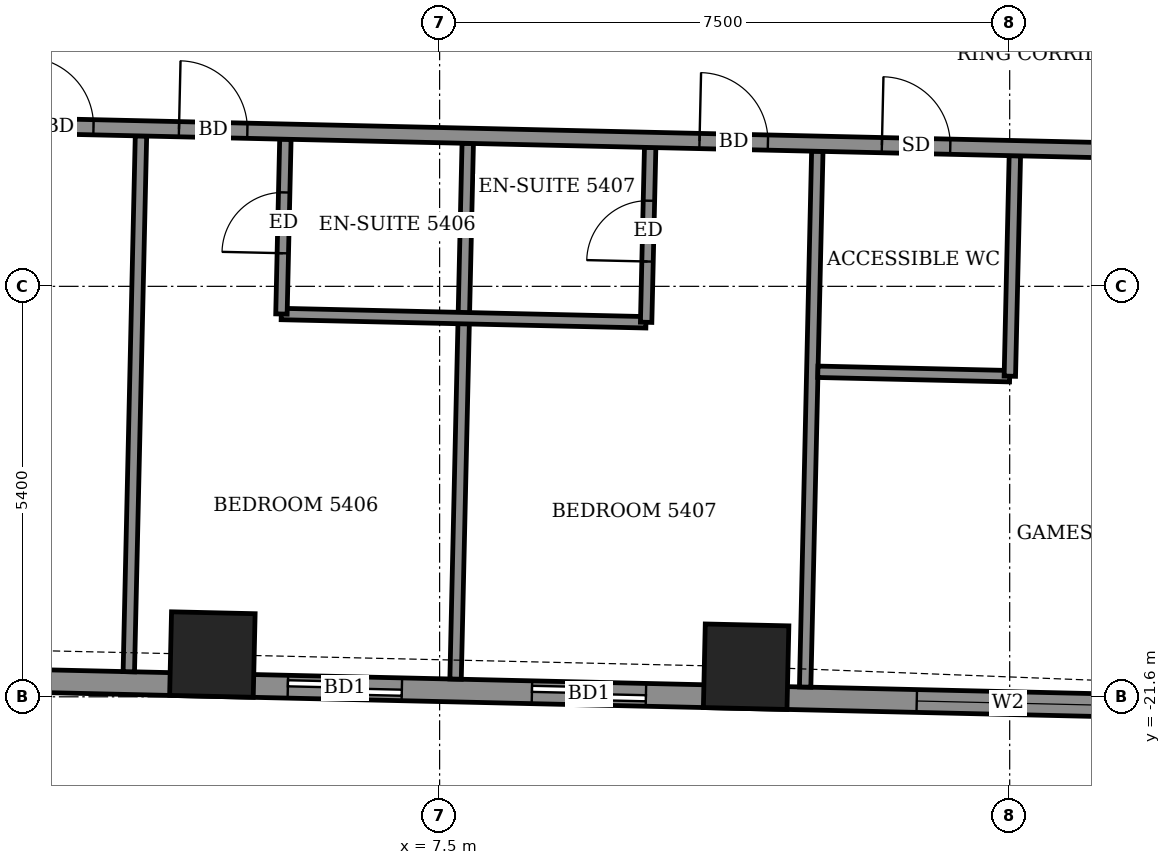
"""IFC4 building model, lengths in metres.
Left out: names, types, materials, properties, quantities, classifications, styles, units other than length and angle.
Written with IfcOpenShell. Run it as: python <this file> out.ifc"""

import sys

from ifc_helpers import new_model, si_unit, direction, frame, frame_2d, origin, origin_2d, place, context, subcontext, project, spatial, rectangle, extrude, element, fill, save


model = new_model("IFC4")
c1 = context("Model", 3, precision=1e-05, world=origin(), true_north=direction((0.0, 1.0)))
c2 = subcontext(c1, "Body", "Model", "MODEL_VIEW")
j1 = project(units=[si_unit("LENGTHUNIT", "METRE"), si_unit("PLANEANGLEUNIT", "RADIAN")], contexts=[c1])
p1 = place(None, origin())
s1 = spatial("IfcSite", under=j1, at=p1, CompositionType="ELEMENT")
p2 = place(p1, origin())
s2 = spatial("IfcBuilding", under=s1, at=p2, CompositionType="ELEMENT")
p3 = place(p2, frame((0.0, 0.0, 212.3)))
s3 = spatial("IfcBuildingStorey", under=s2, at=p3, CompositionType="ELEMENT", Elevation=212.3)
for number, where, z_axis, x_axis in (
    (1, (4.51, -21.044, -0.55), (0.0, 0.0, 1.0), (1.0, -0.023, 0.0)),
    (2, (11.532, -21.204, -0.55), (0.0, 0.0, 1.0), (1.0, -0.023, 0.0)),
):
    element("IfcColumn", number, at=place(p3, frame(where, z_axis=z_axis, x_axis=x_axis)), inside=s3, PredefinedType="COLUMN", context=c2, shape_type="SweptSolid", body=[
        extrude(rectangle(XDim=1.1, YDim=1.1, at=origin_2d()), origin(), (0.0, 0.0, 1.0), 3.6),
    ])
p4 = place(p3, frame((-23.437, -20.81, 0.0), z_axis=(0.0, 0.0, 1.0), x_axis=(0.999742269115, -0.022702320244, 0.0)))
e3 = element("IfcWall", 3, at=p4, inside=s3, PredefinedType="SOLIDWALL", context=c2, shape_type="SweptSolid", body=[
    extrude(rectangle(XDim=41.844, YDim=0.3, at=frame_2d((20.922, 0.0))), origin(), (0.0, 0.0, 1.0), 2.55),
])
p5 = place(p4, frame((1.825, 0.0, 0.0)))
e4 = element("IfcOpeningElement", 4, at=p5, cuts=e3, PredefinedType="OPENING", context=c2, shape_type="SweptSolid", body=[
    extrude(rectangle(XDim=1.5, YDim=2.4, at=frame_2d((0.75, 1.2))), frame((0.0, 0.16, 0.0), z_axis=(0.0, -1.0, 0.0), x_axis=(1.0, 0.0, 0.0)), (0.0, 0.0, 1.0), 0.32),
])
p6 = place(p4, frame((4.937, 0.0, 0.0)))
e5 = element("IfcOpeningElement", 5, at=p6, cuts=e3, PredefinedType="OPENING", context=c2, shape_type="SweptSolid", body=[
    extrude(rectangle(XDim=1.2, YDim=2.4, at=frame_2d((0.6, 1.2))), frame((0.0, 0.16, 0.0), z_axis=(0.0, -1.0, 0.0), x_axis=(1.0, 0.0, 0.0)), (0.0, 0.0, 1.0), 0.32),
])
p7 = place(p4, frame((10.3, 0.0, 0.0)))
e6 = element("IfcOpeningElement", 6, at=p7, cuts=e3, PredefinedType="OPENING", context=c2, shape_type="SweptSolid", body=[
    extrude(rectangle(XDim=1.5, YDim=2.4, at=frame_2d((0.75, 1.2))), frame((0.0, 0.16, 0.0), z_axis=(0.0, -1.0, 0.0), x_axis=(1.0, 0.0, 0.0)), (0.0, 0.0, 1.0), 0.32),
])
p8 = place(p4, frame((15.224, 0.0, 0.0)))
e7 = element("IfcOpeningElement", 7, at=p8, cuts=e3, PredefinedType="OPENING", context=c2, shape_type="SweptSolid", body=[
    extrude(rectangle(XDim=1.5, YDim=2.4, at=frame_2d((0.75, 1.2))), frame((0.0, 0.16, 0.0), z_axis=(0.0, -1.0, 0.0), x_axis=(1.0, 0.0, 0.0)), (0.0, 0.0, 1.0), 0.32),
])
p9 = place(p4, frame((18.436, 0.0, 0.0)))
e8 = element("IfcOpeningElement", 8, at=p9, cuts=e3, PredefinedType="OPENING", context=c2, shape_type="SweptSolid", body=[
    extrude(rectangle(XDim=1.5, YDim=2.4, at=frame_2d((0.75, 1.2))), frame((0.0, 0.16, 0.0), z_axis=(0.0, -1.0, 0.0), x_axis=(1.0, 0.0, 0.0)), (0.0, 0.0, 1.0), 0.32),
])
p10 = place(p4, frame((23.825, 0.0, 0.0)))
e9 = element("IfcOpeningElement", 9, at=p10, cuts=e3, PredefinedType="OPENING", context=c2, shape_type="SweptSolid", body=[
    extrude(rectangle(XDim=1.5, YDim=2.4, at=frame_2d((0.75, 1.2))), frame((0.0, 0.16, 0.0), z_axis=(0.0, -1.0, 0.0), x_axis=(1.0, 0.0, 0.0)), (0.0, 0.0, 1.0), 0.32),
])
p11 = place(p4, frame((28.948, 0.0, 0.0)))
e10 = element("IfcOpeningElement", 10, at=p11, cuts=e3, PredefinedType="OPENING", context=c2, shape_type="SweptSolid", body=[
    extrude(rectangle(XDim=1.5, YDim=2.4, at=frame_2d((0.75, 1.2))), frame((0.0, 0.16, 0.0), z_axis=(0.0, -1.0, 0.0), x_axis=(1.0, 0.0, 0.0)), (0.0, 0.0, 1.0), 0.32),
])
p12 = place(p4, frame((32.16, 0.0, 0.0)))
e11 = element("IfcOpeningElement", 11, at=p12, cuts=e3, PredefinedType="OPENING", context=c2, shape_type="SweptSolid", body=[
    extrude(rectangle(XDim=1.5, YDim=2.4, at=frame_2d((0.75, 1.2))), frame((0.0, 0.16, 0.0), z_axis=(0.0, -1.0, 0.0), x_axis=(1.0, 0.0, 0.0)), (0.0, 0.0, 1.0), 0.32),
])
p13 = place(p4, frame((37.224, 0.0, 0.9)))
e12 = element("IfcOpeningElement", 12, at=p13, cuts=e3, PredefinedType="OPENING", context=c2, shape_type="SweptSolid", body=[
    extrude(rectangle(XDim=2.4, YDim=1.5, at=frame_2d((1.2, 0.75))), frame((0.0, 0.16, 0.0), z_axis=(0.0, -1.0, 0.0), x_axis=(1.0, 0.0, 0.0)), (0.0, 0.0, 1.0), 0.32),
])
p14 = place(p3, frame((3.411, -21.27, 0.0), z_axis=(0.0, 0.0, 1.0), x_axis=(0.022714326521, 0.999741996402, 0.0)))
e13 = element("IfcWall", 13, at=p14, inside=s3, PredefinedType="PARTITIONING", context=c2, shape_type="SweptSolid", body=[
    extrude(rectangle(XDim=7.051, YDim=0.15, at=frame_2d((3.525, 0.0))), origin(), (0.0, 0.0, 1.0), 2.55),
])
p15 = place(p3, frame((7.71, -21.367, 0.0), z_axis=(0.0, 0.0, 1.0), x_axis=(0.022718258661, 0.999741907056, 0.0)))
e14 = element("IfcWall", 14, at=p15, inside=s3, PredefinedType="PARTITIONING", context=c2, shape_type="SweptSolid", body=[
    extrude(rectangle(XDim=7.05, YDim=0.15, at=frame_2d((3.525, 0.0))), origin(), (0.0, 0.0, 1.0), 2.55),
])
p16 = place(p3, frame((12.309, -21.472, 0.0), z_axis=(0.0, 0.0, 1.0), x_axis=(0.022680503969, 0.999742764285, 0.0)))
e15 = element("IfcWall", 15, at=p16, inside=s3, PredefinedType="PARTITIONING", context=c2, shape_type="SweptSolid", body=[
    extrude(rectangle(XDim=7.051, YDim=0.15, at=frame_2d((3.525, 0.0))), origin(), (0.0, 0.0, 1.0), 2.55),
])
p17 = place(p3, frame((12.476, -17.324, 0.0), z_axis=(0.0, 0.0, 1.0), x_axis=(0.999735102249, -0.023015762656, 0.0)))
e16 = element("IfcWall", 16, at=p17, inside=s3, PredefinedType="PARTITIONING", context=c2, shape_type="SweptSolid", body=[
    extrude(rectangle(XDim=2.525, YDim=0.15, at=frame_2d((1.262, 0.0))), origin(), (0.0, 0.0, 1.0), 3.05),
])
p18 = place(p3, frame((15.002, -17.382, 0.0), z_axis=(0.0, 0.0, 1.0), x_axis=(0.022807433839, 0.999739876649, 0.0)))
e17 = element("IfcWall", 17, at=p18, inside=s3, PredefinedType="PARTITIONING", context=c2, shape_type="SweptSolid", body=[
    extrude(rectangle(XDim=2.901, YDim=0.15, at=frame_2d((1.45, 0.0))), origin(), (0.0, 0.0, 1.0), 3.05),
])
p19 = place(p3, frame((5.417, -16.564, 0.0), z_axis=(0.0, 0.0, 1.0), x_axis=(0.999741441463, -0.022738738327, 0.0)))
e18 = element("IfcWall", 18, at=p19, inside=s3, PredefinedType="PARTITIONING", context=c2, shape_type="SweptSolid", body=[
    extrude(rectangle(XDim=4.799, YDim=0.15, at=frame_2d((2.4, 0.0))), origin(), (0.0, 0.0, 1.0), 3.05),
])
p20 = place(p3, frame((5.419, -16.564, 0.0), z_axis=(0.0, 0.0, 1.0), x_axis=(0.022612884682, 0.999744296031, 0.0)))
e19 = element("IfcWall", 19, at=p20, inside=s3, PredefinedType="PARTITIONING", context=c2, shape_type="SweptSolid", body=[
    extrude(rectangle(XDim=2.3, YDim=0.15, at=frame_2d((1.15, 0.0))), origin(), (0.0, 0.0, 1.0), 3.05),
])
p21 = place(p20, frame((0.8, 0.0, 0.0)))
e20 = element("IfcOpeningElement", 20, at=p21, cuts=e19, PredefinedType="OPENING", context=c2, shape_type="SweptSolid", body=[
    extrude(rectangle(XDim=0.8, YDim=2.1, at=frame_2d((0.4, 1.05))), frame((0.0, 0.085, 0.0), z_axis=(0.0, -1.0, 0.0), x_axis=(1.0, 0.0, 0.0)), (0.0, 0.0, 1.0), 0.17),
])
p22 = place(p3, frame((10.217, -16.673, 0.0), z_axis=(0.0, 0.0, 1.0), x_axis=(0.023027540424, 0.999734831034, 0.0)))
e21 = element("IfcWall", 21, at=p22, inside=s3, PredefinedType="PARTITIONING", context=c2, shape_type="SweptSolid", body=[
    extrude(rectangle(XDim=2.301, YDim=0.15, at=frame_2d((1.15, 0.0))), origin(), (0.0, 0.0, 1.0), 3.05),
])
p23 = place(p22, frame((0.8, 0.0, 0.0)))
e22 = element("IfcOpeningElement", 22, at=p23, cuts=e21, PredefinedType="OPENING", context=c2, shape_type="SweptSolid", body=[
    extrude(rectangle(XDim=0.8, YDim=2.1, at=frame_2d((0.4, 1.05))), frame((0.0, 0.085, 0.0), z_axis=(0.0, -1.0, 0.0), x_axis=(1.0, 0.0, 0.0)), (0.0, 0.0, 1.0), 0.17),
])
p24 = place(p3, frame((-26.421, -13.441, 0.0), z_axis=(0.0, 0.0, 1.0), x_axis=(0.999742754064, -0.022680954485, 0.0)))
e23 = element("IfcWall", 23, at=p24, inside=s3, PredefinedType="PARTITIONING", context=c2, shape_type="SweptSolid", body=[
    extrude(rectangle(XDim=48.945, YDim=0.2, at=frame_2d((24.472, 0.0))), origin(), (0.0, 0.0, 1.0), 3.05),
])
p25 = place(p24, frame((1.425, 0.0, 0.0)))
e24 = element("IfcOpeningElement", 24, at=p25, cuts=e23, PredefinedType="OPENING", context=c2, shape_type="SweptSolid", body=[
    extrude(rectangle(XDim=1.0, YDim=2.1, at=frame_2d((0.5, 1.05))), frame((0.0, 0.11, 0.0), z_axis=(0.0, -1.0, 0.0), x_axis=(1.0, 0.0, 0.0)), (0.0, 0.0, 1.0), 0.22),
])
p26 = place(p24, frame((6.0, 0.0, 0.0)))
e25 = element("IfcOpeningElement", 25, at=p26, cuts=e23, PredefinedType="OPENING", context=c2, shape_type="SweptSolid", body=[
    extrude(rectangle(XDim=0.9, YDim=2.1, at=frame_2d((0.45, 1.05))), frame((0.0, 0.11, 0.0), z_axis=(0.0, -1.0, 0.0), x_axis=(1.0, 0.0, 0.0)), (0.0, 0.0, 1.0), 0.22),
])
p27 = place(p24, frame((10.55, 0.0, 0.0)))
e26 = element("IfcOpeningElement", 26, at=p27, cuts=e23, PredefinedType="OPENING", context=c2, shape_type="SweptSolid", body=[
    extrude(rectangle(XDim=0.9, YDim=2.1, at=frame_2d((0.45, 1.05))), frame((0.0, 0.11, 0.0), z_axis=(0.0, -1.0, 0.0), x_axis=(1.0, 0.0, 0.0)), (0.0, 0.0, 1.0), 0.22),
])
p28 = place(p24, frame((12.55, 0.0, 0.0)))
e27 = element("IfcOpeningElement", 27, at=p28, cuts=e23, PredefinedType="OPENING", context=c2, shape_type="SweptSolid", body=[
    extrude(rectangle(XDim=0.9, YDim=2.1, at=frame_2d((0.45, 1.05))), frame((0.0, 0.11, 0.0), z_axis=(0.0, -1.0, 0.0), x_axis=(1.0, 0.0, 0.0)), (0.0, 0.0, 1.0), 0.22),
])
p29 = place(p24, frame((19.425, 0.0, 0.0)))
e28 = element("IfcOpeningElement", 28, at=p29, cuts=e23, PredefinedType="OPENING", context=c2, shape_type="SweptSolid", body=[
    extrude(rectangle(XDim=0.9, YDim=2.1, at=frame_2d((0.45, 1.05))), frame((0.0, 0.11, 0.0), z_axis=(0.0, -1.0, 0.0), x_axis=(1.0, 0.0, 0.0)), (0.0, 0.0, 1.0), 0.22),
])
p30 = place(p24, frame((21.525, 0.0, 0.0)))
e29 = element("IfcOpeningElement", 29, at=p30, cuts=e23, PredefinedType="OPENING", context=c2, shape_type="SweptSolid", body=[
    extrude(rectangle(XDim=0.9, YDim=2.1, at=frame_2d((0.45, 1.05))), frame((0.0, 0.11, 0.0), z_axis=(0.0, -1.0, 0.0), x_axis=(1.0, 0.0, 0.0)), (0.0, 0.0, 1.0), 0.22),
])
p31 = place(p24, frame((28.475, 0.0, 0.0)))
e30 = element("IfcOpeningElement", 30, at=p31, cuts=e23, PredefinedType="OPENING", context=c2, shape_type="SweptSolid", body=[
    extrude(rectangle(XDim=0.9, YDim=2.1, at=frame_2d((0.45, 1.05))), frame((0.0, 0.11, 0.0), z_axis=(0.0, -1.0, 0.0), x_axis=(1.0, 0.0, 0.0)), (0.0, 0.0, 1.0), 0.22),
])
p32 = place(p24, frame((30.5, 0.0, 0.0)))
e31 = element("IfcOpeningElement", 31, at=p32, cuts=e23, PredefinedType="OPENING", context=c2, shape_type="SweptSolid", body=[
    extrude(rectangle(XDim=0.9, YDim=2.1, at=frame_2d((0.45, 1.05))), frame((0.0, 0.11, 0.0), z_axis=(0.0, -1.0, 0.0), x_axis=(1.0, 0.0, 0.0)), (0.0, 0.0, 1.0), 0.22),
])
p33 = place(p24, frame((37.35, 0.0, 0.0)))
e32 = element("IfcOpeningElement", 32, at=p33, cuts=e23, PredefinedType="OPENING", context=c2, shape_type="SweptSolid", body=[
    extrude(rectangle(XDim=0.9, YDim=2.1, at=frame_2d((0.45, 1.05))), frame((0.0, 0.11, 0.0), z_axis=(0.0, -1.0, 0.0), x_axis=(1.0, 0.0, 0.0)), (0.0, 0.0, 1.0), 0.22),
])
p34 = place(p24, frame((45.422, 0.0, 0.0)))
e33 = element("IfcOpeningElement", 33, at=p34, cuts=e23, PredefinedType="OPENING", context=c2, shape_type="SweptSolid", body=[
    extrude(rectangle(XDim=1.0, YDim=2.1, at=frame_2d((0.5, 1.05))), frame((0.0, 0.11, 0.0), z_axis=(0.0, -1.0, 0.0), x_axis=(1.0, 0.0, 0.0)), (0.0, 0.0, 1.0), 0.22),
])
p35 = place(p24, frame((39.75, 0.0, 0.0)))
e34 = element("IfcOpeningElement", 34, at=p35, cuts=e23, PredefinedType="OPENING", context=c2, shape_type="SweptSolid", body=[
    extrude(rectangle(XDim=0.9, YDim=2.1, at=frame_2d((0.45, 1.05))), frame((0.0, 0.11, 0.0), z_axis=(0.0, -1.0, 0.0), x_axis=(1.0, 0.0, 0.0)), (0.0, 0.0, 1.0), 0.22),
])
p36 = place(p11, origin())
e35 = element("IfcDoor", 35, at=p36, inside=s3, OperationType="SLIDING_TO_LEFT", PredefinedType="DOOR", context=c2, shape_type="SweptSolid", body=[
    extrude(rectangle(XDim=1.5, YDim=2.4, at=frame_2d((0.75, 1.2))), frame((0.0, 0.025, 0.0), z_axis=(0.0, -1.0, 0.0), x_axis=(1.0, 0.0, 0.0)), (0.0, 0.0, 1.0), 0.05),
])
fill(e10, e35)
p37 = place(p12, origin())
e36 = element("IfcDoor", 36, at=p37, inside=s3, OperationType="SLIDING_TO_LEFT", PredefinedType="DOOR", context=c2, shape_type="SweptSolid", body=[
    extrude(rectangle(XDim=1.5, YDim=2.4, at=frame_2d((0.75, 1.2))), frame((0.0, 0.025, 0.0), z_axis=(0.0, -1.0, 0.0), x_axis=(1.0, 0.0, 0.0)), (0.0, 0.0, 1.0), 0.05),
])
fill(e11, e36)
p38 = place(p13, origin())
e37 = element("IfcWindow", 37, at=p38, inside=s3, PartitioningType="DOUBLE_PANEL_VERTICAL", PredefinedType="WINDOW", context=c2, shape_type="SweptSolid", body=[
    extrude(rectangle(XDim=2.4, YDim=1.5, at=frame_2d((1.2, 0.75))), frame((0.0, 0.03, 0.0), z_axis=(0.0, -1.0, 0.0), x_axis=(1.0, 0.0, 0.0)), (0.0, 0.0, 1.0), 0.06),
])
fill(e12, e37)
p39 = place(p31, origin())
e38 = element("IfcDoor", 38, at=p39, inside=s3, OperationType="SINGLE_SWING_LEFT", PredefinedType="DOOR", context=c2, shape_type="SweptSolid", body=[
    extrude(rectangle(XDim=0.9, YDim=2.1, at=frame_2d((0.45, 1.05))), frame((0.0, 0.025, 0.0), z_axis=(0.0, -1.0, 0.0), x_axis=(1.0, 0.0, 0.0)), (0.0, 0.0, 1.0), 0.05),
])
fill(e30, e38)
p40 = place(p32, origin())
e39 = element("IfcDoor", 39, at=p40, inside=s3, OperationType="SINGLE_SWING_RIGHT", PredefinedType="DOOR", context=c2, shape_type="SweptSolid", body=[
    extrude(rectangle(XDim=0.9, YDim=2.1, at=frame_2d((0.45, 1.05))), frame((0.0, 0.025, 0.0), z_axis=(0.0, -1.0, 0.0), x_axis=(1.0, 0.0, 0.0)), (0.0, 0.0, 1.0), 0.05),
])
fill(e31, e39)
p41 = place(p21, origin())
e40 = element("IfcDoor", 40, at=p41, inside=s3, OperationType="SINGLE_SWING_RIGHT", PredefinedType="DOOR", context=c2, shape_type="SweptSolid", body=[
    extrude(rectangle(XDim=0.8, YDim=2.1, at=frame_2d((0.4, 1.05))), frame((0.0, 0.025, 0.0), z_axis=(0.0, -1.0, 0.0), x_axis=(1.0, 0.0, 0.0)), (0.0, 0.0, 1.0), 0.05),
])
fill(e20, e40)
p42 = place(p33, origin())
e41 = element("IfcDoor", 41, at=p42, inside=s3, OperationType="SINGLE_SWING_LEFT", PredefinedType="DOOR", context=c2, shape_type="SweptSolid", body=[
    extrude(rectangle(XDim=0.9, YDim=2.1, at=frame_2d((0.45, 1.05))), frame((0.0, 0.025, 0.0), z_axis=(0.0, -1.0, 0.0), x_axis=(1.0, 0.0, 0.0)), (0.0, 0.0, 1.0), 0.05),
])
fill(e32, e41)
p43 = place(p23, origin())
e42 = element("IfcDoor", 42, at=p43, inside=s3, OperationType="SINGLE_SWING_LEFT", PredefinedType="DOOR", context=c2, shape_type="SweptSolid", body=[
    extrude(rectangle(XDim=0.8, YDim=2.1, at=frame_2d((0.4, 1.05))), frame((0.0, 0.025, 0.0), z_axis=(0.0, -1.0, 0.0), x_axis=(1.0, 0.0, 0.0)), (0.0, 0.0, 1.0), 0.05),
])
fill(e22, e42)
p44 = place(p35, origin())
e43 = element("IfcDoor", 43, at=p44, inside=s3, OperationType="SINGLE_SWING_RIGHT", PredefinedType="DOOR", context=c2, shape_type="SweptSolid", body=[
    extrude(rectangle(XDim=0.9, YDim=2.1, at=frame_2d((0.45, 1.05))), frame((0.0, 0.025, 0.0), z_axis=(0.0, -1.0, 0.0), x_axis=(1.0, 0.0, 0.0)), (0.0, 0.0, 1.0), 0.05),
])
fill(e34, e43)
save(model, sys.argv[1])
